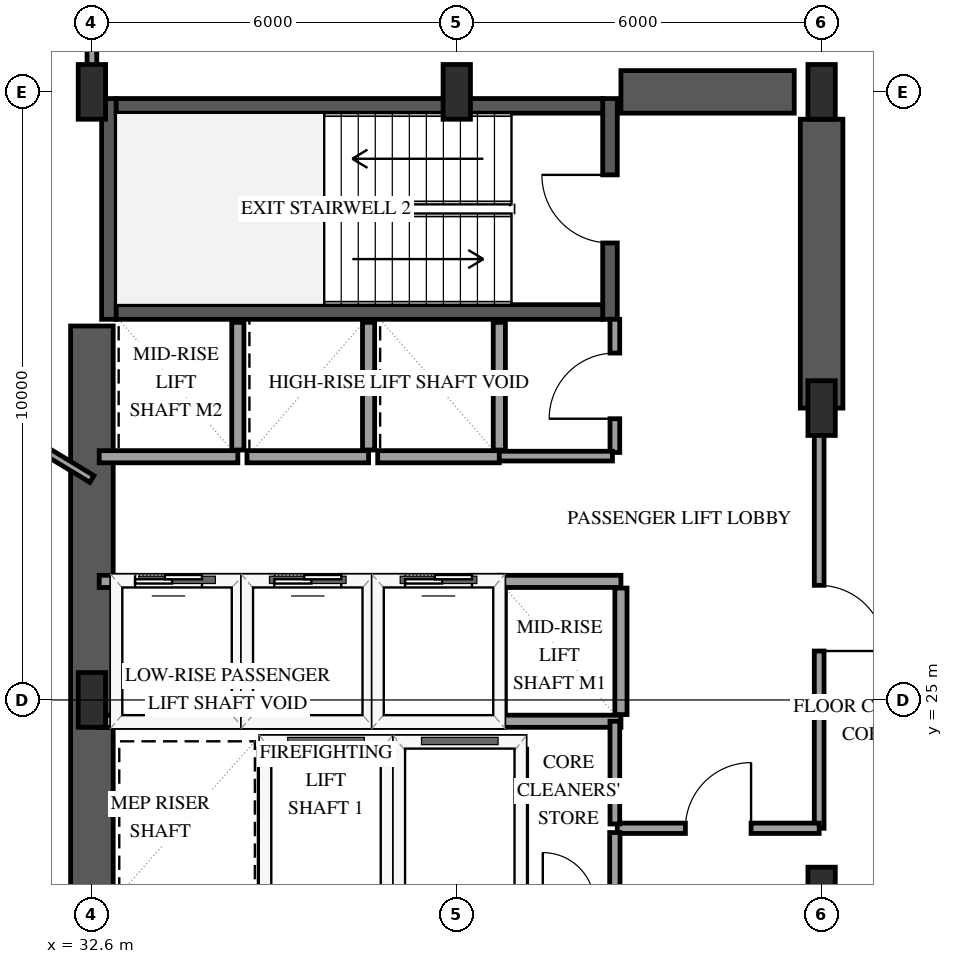
"""IFC4 building model, lengths in metres.
Left out: names, types, materials, properties, quantities, classifications, styles, units other than length and angle.
Written with IfcOpenShell. Run it as: python <this file> out.ifc"""

import sys

from ifc_helpers import new_model, si_unit, direction, frame, frame_2d, origin, origin_2d, place, context, subcontext, project, spatial, rectangle, extrude, element, fill, save


model = new_model("IFC4")
c1 = context("Model", 3, precision=1e-05, world=origin(), true_north=direction((0.0, 1.0)))
c2 = subcontext(c1, "Body", "Model", "MODEL_VIEW")
j1 = project(units=[si_unit("LENGTHUNIT", "METRE"), si_unit("PLANEANGLEUNIT", "RADIAN")], contexts=[c1])
p1 = place(None, origin())
s1 = spatial("IfcSite", under=j1, at=p1, CompositionType="ELEMENT")
p2 = place(p1, origin())
s2 = spatial("IfcBuilding", under=s1, at=p2, CompositionType="ELEMENT")
p3 = place(p2, frame((0.0, 0.0, 78.6)))
s3 = spatial("IfcBuildingStorey", under=s2, at=p3, CompositionType="ELEMENT", Elevation=78.6)
p4 = place(p3, frame((32.88, 31.26, 0.0), z_axis=(0.0, 0.0, 1.0), x_axis=(0.0, 1.0, 0.0)))
e1 = element("IfcWall", 1, at=p4, inside=s3, PredefinedType="SHEAR", context=c2, shape_type="SweptSolid", body=[
    extrude(rectangle(XDim=3.63, YDim=0.24, at=frame_2d((1.815, 0.0))), origin(), (0.0, 0.0, 1.0), 4.0),
])
p5 = place(p3, frame((41.12, 31.26, 0.0), z_axis=(0.0, 0.0, 1.0), x_axis=(0.0, 1.0, 0.0)))
e2 = element("IfcWall", 2, at=p5, inside=s3, PredefinedType="SHEAR", context=c2, shape_type="SweptSolid", body=[
    extrude(rectangle(XDim=3.63, YDim=0.24, at=frame_2d((1.815, 0.0))), origin(), (0.0, 0.0, 1.0), 4.0),
])
p6 = place(p5, frame((1.255, 0.0, 0.0)))
e3 = element("IfcOpeningElement", 3, at=p6, cuts=e2, PredefinedType="OPENING", context=c2, shape_type="SweptSolid", body=[
    extrude(rectangle(XDim=1.12, YDim=2.15, at=frame_2d((0.56, 1.075))), frame((0.0, 0.13, 0.0), z_axis=(0.0, -1.0, 0.0), x_axis=(1.0, 0.0, 0.0)), (0.0, 0.0, 1.0), 0.26),
])
for number, where, z_axis, x_axis in (
    (4, (33.0, 31.38, 0.0), (0.0, 0.0, 1.0), (1.0, 0.0, 0.0)),
    (5, (33.0, 34.77, 0.0), (0.0, 0.0, 1.0), (1.0, 0.0, 0.0)),
):
    element("IfcWall", number, at=place(p3, frame(where, z_axis=z_axis, x_axis=x_axis)), inside=s3, PredefinedType="SHEAR", context=c2, shape_type="SweptSolid", body=[
        extrude(rectangle(XDim=8.0, YDim=0.24, at=frame_2d((4.0, 0.0))), origin(), (0.0, 0.0, 1.0), 4.0),
    ])
p7 = place(p3, frame((32.6, 18.85, 0.0), z_axis=(0.0, 0.0, 1.0), x_axis=(0.0, 1.0, 0.0)))
e6 = element("IfcWall", 6, at=p7, inside=s3, PredefinedType="SHEAR", context=c2, shape_type="SweptSolid", body=[
    extrude(rectangle(XDim=12.3, YDim=0.7, at=frame_2d((6.15, 0.0))), origin(), (0.0, 0.0, 1.0), 4.0),
])
p8 = place(p3, frame((41.3, 35.0, 0.0), z_axis=(0.0, 0.0, 1.0), x_axis=(1.0, 0.0, 0.0)))
e7 = element("IfcWall", 7, at=p8, inside=s3, PredefinedType="SHEAR", context=c2, shape_type="SweptSolid", body=[
    extrude(rectangle(XDim=2.85, YDim=0.7, at=frame_2d((1.425, 0.0))), origin(), (0.0, 0.0, 1.0), 4.0),
])
p9 = place(p3, frame((44.6, 29.8, 0.0), z_axis=(0.0, 0.0, 1.0), x_axis=(0.0, 1.0, 0.0)))
e8 = element("IfcWall", 8, at=p9, inside=s3, PredefinedType="SHEAR", context=c2, shape_type="SweptSolid", body=[
    extrude(rectangle(XDim=4.75, YDim=0.7, at=frame_2d((2.375, 0.0))), origin(), (0.0, 0.0, 1.0), 4.0),
])
for number, where, z_axis, x_axis in (
    (9, (32.6, 25.0, 0.0), (0.0, 0.0, 1.0), (1.0, 0.0, 0.0)),
    (10, (32.6, 35.0, 0.0), (0.0, 0.0, 1.0), (1.0, 0.0, 0.0)),
    (11, (38.6, 35.0, 0.0), (0.0, 0.0, 1.0), (1.0, 0.0, 0.0)),
    (12, (44.6, 21.8, 0.0), (0.0, 0.0, 1.0), (1.0, 0.0, 0.0)),
    (13, (44.6, 29.8, 0.0), (0.0, 0.0, 1.0), (1.0, 0.0, 0.0)),
    (14, (44.6, 35.0, 0.0), (0.0, 0.0, 1.0), (1.0, 0.0, 0.0)),
):
    element("IfcColumn", number, at=place(p3, frame(where, z_axis=z_axis, x_axis=x_axis)), inside=s3, PredefinedType="PILASTER", context=c2, shape_type="SweptSolid", body=[
        extrude(rectangle(XDim=0.45, YDim=0.9, at=origin_2d()), origin(), (0.0, 0.0, 1.0), 4.0),
    ])
p10 = place(p3, frame((35.45, 24.3, 0.0), z_axis=(0.0, 0.0, 1.0), x_axis=(1.0, 0.0, 0.0)))
e15 = element("IfcWall", 15, at=p10, inside=s3, PredefinedType="SOLIDWALL", context=c2, shape_type="SweptSolid", body=[
    extrude(rectangle(XDim=2.0, YDim=0.2, at=frame_2d((1.0, 0.0))), origin(), (0.0, 0.0, 1.0), 3.66),
])
for number, where, z_axis, x_axis in (
    (16, (35.45, 21.81, 0.0), (0.0, 0.0, 1.0), (0.0, 1.0, 0.0)),
    (17, (37.45, 21.81, 0.0), (0.0, 0.0, 1.0), (0.0, 1.0, 0.0)),
):
    element("IfcWall", number, at=place(p3, frame(where, z_axis=z_axis, x_axis=x_axis)), inside=s3, PredefinedType="SOLIDWALL", context=c2, shape_type="SweptSolid", body=[
        extrude(rectangle(XDim=2.38, YDim=0.2, at=frame_2d((1.19, 0.0))), origin(), (0.0, 0.0, 1.0), 3.66),
    ])
p11 = place(p3, frame((37.65, 24.3, 0.0), z_axis=(0.0, 0.0, 1.0), x_axis=(1.0, 0.0, 0.0)))
e18 = element("IfcWall", 18, at=p11, inside=s3, PredefinedType="SOLIDWALL", context=c2, shape_type="SweptSolid", body=[
    extrude(rectangle(XDim=2.0, YDim=0.2, at=frame_2d((1.0, 0.0))), origin(), (0.0, 0.0, 1.0), 3.66),
])
p12 = place(p3, frame((39.65, 21.81, 0.0), z_axis=(0.0, 0.0, 1.0), x_axis=(0.0, 1.0, 0.0)))
e19 = element("IfcWall", 19, at=p12, inside=s3, PredefinedType="SOLIDWALL", context=c2, shape_type="SweptSolid", body=[
    extrude(rectangle(XDim=2.38, YDim=0.2, at=frame_2d((1.19, 0.0))), origin(), (0.0, 0.0, 1.0), 3.66),
])
p13 = place(p3, frame((32.72, 24.65, 0.0), z_axis=(0.0, 0.0, 1.0), x_axis=(1.0, 0.0, 0.0)))
e20 = element("IfcWall", 20, at=p13, inside=s3, PredefinedType="SOLIDWALL", context=c2, shape_type="SweptSolid", body=[
    extrude(rectangle(XDim=2.28, YDim=0.2, at=frame_2d((1.14, 0.0))), origin(), (0.0, 0.0, 1.0), 3.66),
])
p14 = place(p3, frame((32.72, 26.95, 0.0), z_axis=(0.0, 0.0, 1.0), x_axis=(1.0, 0.0, 0.0)))
e21 = element("IfcWall", 21, at=p14, inside=s3, PredefinedType="SOLIDWALL", context=c2, shape_type="SweptSolid", body=[
    extrude(rectangle(XDim=2.28, YDim=0.2, at=frame_2d((1.14, 0.0))), origin(), (0.0, 0.0, 1.0), 3.66),
])
p15 = place(p14, frame((0.59, 0.0, 0.0)))
e22 = element("IfcOpeningElement", 22, at=p15, cuts=e21, PredefinedType="OPENING", context=c2, shape_type="SweptSolid", body=[
    extrude(rectangle(XDim=1.1, YDim=2.15, at=frame_2d((0.55, 1.075))), frame((0.0, 0.11, 0.0), z_axis=(0.0, -1.0, 0.0), x_axis=(1.0, 0.0, 0.0)), (0.0, 0.0, 1.0), 0.22),
])
p16 = place(p3, frame((35.0, 24.76, 0.0), z_axis=(0.0, 0.0, 1.0), x_axis=(0.0, 1.0, 0.0)))
e23 = element("IfcWall", 23, at=p16, inside=s3, PredefinedType="SOLIDWALL", context=c2, shape_type="SweptSolid", body=[
    extrude(rectangle(XDim=2.08, YDim=0.2, at=frame_2d((1.04, 0.0))), origin(), (0.0, 0.0, 1.0), 3.66),
])
p17 = place(p3, frame((35.15, 24.65, 0.0), z_axis=(0.0, 0.0, 1.0), x_axis=(1.0, 0.0, 0.0)))
e24 = element("IfcWall", 24, at=p17, inside=s3, PredefinedType="SOLIDWALL", context=c2, shape_type="SweptSolid", body=[
    extrude(rectangle(XDim=2.0, YDim=0.2, at=frame_2d((1.0, 0.0))), origin(), (0.0, 0.0, 1.0), 3.66),
])
p18 = place(p3, frame((35.15, 26.95, 0.0), z_axis=(0.0, 0.0, 1.0), x_axis=(1.0, 0.0, 0.0)))
e25 = element("IfcWall", 25, at=p18, inside=s3, PredefinedType="SOLIDWALL", context=c2, shape_type="SweptSolid", body=[
    extrude(rectangle(XDim=2.0, YDim=0.2, at=frame_2d((1.0, 0.0))), origin(), (0.0, 0.0, 1.0), 3.66),
])
p19 = place(p18, frame((0.45, 0.0, 0.0)))
e26 = element("IfcOpeningElement", 26, at=p19, cuts=e25, PredefinedType="OPENING", context=c2, shape_type="SweptSolid", body=[
    extrude(rectangle(XDim=1.1, YDim=2.15, at=frame_2d((0.55, 1.075))), frame((0.0, 0.11, 0.0), z_axis=(0.0, -1.0, 0.0), x_axis=(1.0, 0.0, 0.0)), (0.0, 0.0, 1.0), 0.22),
])
p20 = place(p3, frame((37.15, 24.76, 0.0), z_axis=(0.0, 0.0, 1.0), x_axis=(0.0, 1.0, 0.0)))
e27 = element("IfcWall", 27, at=p20, inside=s3, PredefinedType="SOLIDWALL", context=c2, shape_type="SweptSolid", body=[
    extrude(rectangle(XDim=2.08, YDim=0.2, at=frame_2d((1.04, 0.0))), origin(), (0.0, 0.0, 1.0), 3.66),
])
p21 = place(p3, frame((37.3, 24.65, 0.0), z_axis=(0.0, 0.0, 1.0), x_axis=(1.0, 0.0, 0.0)))
e28 = element("IfcWall", 28, at=p21, inside=s3, PredefinedType="SOLIDWALL", context=c2, shape_type="SweptSolid", body=[
    extrude(rectangle(XDim=2.0, YDim=0.2, at=frame_2d((1.0, 0.0))), origin(), (0.0, 0.0, 1.0), 3.66),
])
p22 = place(p3, frame((37.3, 26.95, 0.0), z_axis=(0.0, 0.0, 1.0), x_axis=(1.0, 0.0, 0.0)))
e29 = element("IfcWall", 29, at=p22, inside=s3, PredefinedType="SOLIDWALL", context=c2, shape_type="SweptSolid", body=[
    extrude(rectangle(XDim=2.0, YDim=0.2, at=frame_2d((1.0, 0.0))), origin(), (0.0, 0.0, 1.0), 3.66),
])
p23 = place(p22, frame((0.45, 0.0, 0.0)))
e30 = element("IfcOpeningElement", 30, at=p23, cuts=e29, PredefinedType="OPENING", context=c2, shape_type="SweptSolid", body=[
    extrude(rectangle(XDim=1.1, YDim=2.15, at=frame_2d((0.55, 1.075))), frame((0.0, 0.11, 0.0), z_axis=(0.0, -1.0, 0.0), x_axis=(1.0, 0.0, 0.0)), (0.0, 0.0, 1.0), 0.22),
])
p24 = place(p3, frame((39.3, 24.76, 0.0), z_axis=(0.0, 0.0, 1.0), x_axis=(0.0, 1.0, 0.0)))
e31 = element("IfcWall", 31, at=p24, inside=s3, PredefinedType="SOLIDWALL", context=c2, shape_type="SweptSolid", body=[
    extrude(rectangle(XDim=2.08, YDim=0.2, at=frame_2d((1.04, 0.0))), origin(), (0.0, 0.0, 1.0), 3.66),
])
for number, where, z_axis, x_axis in (
    (32, (39.3, 24.65, 0.0), (0.0, 0.0, 1.0), (1.0, 0.0, 0.0)),
    (33, (39.3, 26.95, 0.0), (0.0, 0.0, 1.0), (1.0, 0.0, 0.0)),
):
    element("IfcWall", number, at=place(p3, frame(where, z_axis=z_axis, x_axis=x_axis)), inside=s3, PredefinedType="SOLIDWALL", context=c2, shape_type="SweptSolid", body=[
        extrude(rectangle(XDim=2.0, YDim=0.2, at=frame_2d((1.0, 0.0))), origin(), (0.0, 0.0, 1.0), 3.66),
    ])
p25 = place(p3, frame((41.3, 24.76, 0.0), z_axis=(0.0, 0.0, 1.0), x_axis=(0.0, 1.0, 0.0)))
e34 = element("IfcWall", 34, at=p25, inside=s3, PredefinedType="SOLIDWALL", context=c2, shape_type="SweptSolid", body=[
    extrude(rectangle(XDim=2.08, YDim=0.2, at=frame_2d((1.04, 0.0))), origin(), (0.0, 0.0, 1.0), 3.66),
])
p26 = place(p3, frame((32.72, 29.0, 0.0), z_axis=(0.0, 0.0, 1.0), x_axis=(1.0, 0.0, 0.0)))
e35 = element("IfcWall", 35, at=p26, inside=s3, PredefinedType="SOLIDWALL", context=c2, shape_type="SweptSolid", body=[
    extrude(rectangle(XDim=2.28, YDim=0.2, at=frame_2d((1.14, 0.0))), origin(), (0.0, 0.0, 1.0), 3.66),
])
p27 = place(p3, frame((35.0, 29.11, 0.0), z_axis=(0.0, 0.0, 1.0), x_axis=(0.0, 1.0, 0.0)))
e36 = element("IfcWall", 36, at=p27, inside=s3, PredefinedType="SOLIDWALL", context=c2, shape_type="SweptSolid", body=[
    extrude(rectangle(XDim=2.1, YDim=0.2, at=frame_2d((1.05, 0.0))), origin(), (0.0, 0.0, 1.0), 3.66),
])
p28 = place(p3, frame((35.15, 29.0, 0.0), z_axis=(0.0, 0.0, 1.0), x_axis=(1.0, 0.0, 0.0)))
e37 = element("IfcWall", 37, at=p28, inside=s3, PredefinedType="SOLIDWALL", context=c2, shape_type="SweptSolid", body=[
    extrude(rectangle(XDim=2.0, YDim=0.2, at=frame_2d((1.0, 0.0))), origin(), (0.0, 0.0, 1.0), 3.66),
])
p29 = place(p3, frame((37.15, 29.11, 0.0), z_axis=(0.0, 0.0, 1.0), x_axis=(0.0, 1.0, 0.0)))
e38 = element("IfcWall", 38, at=p29, inside=s3, PredefinedType="SOLIDWALL", context=c2, shape_type="SweptSolid", body=[
    extrude(rectangle(XDim=2.1, YDim=0.2, at=frame_2d((1.05, 0.0))), origin(), (0.0, 0.0, 1.0), 3.66),
])
p30 = place(p3, frame((37.3, 29.0, 0.0), z_axis=(0.0, 0.0, 1.0), x_axis=(1.0, 0.0, 0.0)))
e39 = element("IfcWall", 39, at=p30, inside=s3, PredefinedType="SOLIDWALL", context=c2, shape_type="SweptSolid", body=[
    extrude(rectangle(XDim=2.0, YDim=0.2, at=frame_2d((1.0, 0.0))), origin(), (0.0, 0.0, 1.0), 3.66),
])
p31 = place(p3, frame((39.3, 29.11, 0.0), z_axis=(0.0, 0.0, 1.0), x_axis=(0.0, 1.0, 0.0)))
e40 = element("IfcWall", 40, at=p31, inside=s3, PredefinedType="SOLIDWALL", context=c2, shape_type="SweptSolid", body=[
    extrude(rectangle(XDim=2.1, YDim=0.2, at=frame_2d((1.05, 0.0))), origin(), (0.0, 0.0, 1.0), 3.66),
])
p32 = place(p3, frame((32.6, 28.634, 0.0), z_axis=(0.0, 0.0, 1.0), x_axis=(-0.855395761356, 0.517974991147, 0.0)))
e41 = element("IfcWall", 41, at=p32, inside=s3, PredefinedType="PARTITIONING", context=c2, shape_type="SweptSolid", body=[
    extrude(rectangle(XDim=7.122, YDim=0.13, at=frame_2d((3.561, 0.0))), origin(), (0.0, 0.0, 1.0), 3.66),
])
p33 = place(p3, frame((44.56, 29.8, 0.0), z_axis=(0.0, 0.0, 1.0), x_axis=(0.0, -1.0, 0.0)))
e42 = element("IfcWall", 42, at=p33, inside=s3, PredefinedType="PARTITIONING", context=c2, shape_type="SweptSolid", body=[
    extrude(rectangle(XDim=6.91, YDim=0.16, at=frame_2d((3.455, 0.0))), origin(), (0.0, 0.0, 1.0), 2.7),
])
p34 = place(p33, frame((2.915, 0.0, 0.0)))
e43 = element("IfcOpeningElement", 43, at=p34, cuts=e42, PredefinedType="OPENING", context=c2, shape_type="SweptSolid", body=[
    extrude(rectangle(XDim=1.08, YDim=2.15, at=frame_2d((0.54, 1.075))), frame((0.0, 0.09, 0.0), z_axis=(0.0, -1.0, 0.0), x_axis=(1.0, 0.0, 0.0)), (0.0, 0.0, 1.0), 0.18),
])
p35 = place(p3, frame((41.24, 22.89, 0.0), z_axis=(0.0, 0.0, 1.0), x_axis=(1.0, 0.0, 0.0)))
e44 = element("IfcWall", 44, at=p35, inside=s3, PredefinedType="PARTITIONING", context=c2, shape_type="SweptSolid", body=[
    extrude(rectangle(XDim=3.32, YDim=0.17, at=frame_2d((1.66, 0.0))), origin(), (0.0, 0.0, 1.0), 3.66),
])
p36 = place(p35, frame((1.12, 0.0, 0.0)))
e45 = element("IfcOpeningElement", 45, at=p36, cuts=e44, PredefinedType="OPENING", context=c2, shape_type="SweptSolid", body=[
    extrude(rectangle(XDim=1.08, YDim=2.15, at=frame_2d((0.54, 1.075))), frame((0.0, 0.095, 0.0), z_axis=(0.0, -1.0, 0.0), x_axis=(1.0, 0.0, 0.0)), (0.0, 0.0, 1.0), 0.19),
])
p37 = place(p3, frame((41.2, 29.07, 0.0), z_axis=(0.0, 0.0, 1.0), x_axis=(0.0, 1.0, 0.0)))
e46 = element("IfcWall", 46, at=p37, inside=s3, PredefinedType="PARTITIONING", context=c2, shape_type="SweptSolid", body=[
    extrude(rectangle(XDim=2.19, YDim=0.16, at=frame_2d((1.095, 0.0))), origin(), (0.0, 0.0, 1.0), 3.66),
])
p38 = place(p37, frame((0.555, 0.0, 0.0)))
e47 = element("IfcOpeningElement", 47, at=p38, cuts=e46, PredefinedType="OPENING", context=c2, shape_type="SweptSolid", body=[
    extrude(rectangle(XDim=1.08, YDim=2.15, at=frame_2d((0.54, 1.075))), frame((0.0, 0.09, 0.0), z_axis=(0.0, -1.0, 0.0), x_axis=(1.0, 0.0, 0.0)), (0.0, 0.0, 1.0), 0.18),
])
p39 = place(p3, frame((32.6, 35.07, 0.0), z_axis=(0.0, 0.0, 1.0), x_axis=(0.0, 1.0, 0.0)))
e48 = element("IfcWall", 48, at=p39, inside=s3, PredefinedType="PARTITIONING", context=c2, shape_type="SweptSolid", body=[
    extrude(rectangle(XDim=1.91, YDim=0.16, at=frame_2d((0.955, 0.0))), origin(), (0.0, 0.0, 1.0), 3.66),
])
p40 = place(p3, frame((39.3, 29.01, 0.0), z_axis=(0.0, 0.0, 1.0), x_axis=(1.0, 0.0, 0.0)))
e49 = element("IfcWall", 49, at=p40, inside=s3, PredefinedType="PARTITIONING", context=c2, shape_type="SweptSolid", body=[
    extrude(rectangle(XDim=1.86, YDim=0.16, at=frame_2d((0.93, 0.0))), origin(), (0.0, 0.0, 1.0), 3.66),
])
p41 = place(p3, frame((41.2, 22.96, 0.0), z_axis=(0.0, 0.0, 1.0), x_axis=(0.0, 1.0, 0.0)))
e50 = element("IfcWall", 50, at=p41, inside=s3, PredefinedType="PARTITIONING", context=c2, shape_type="SweptSolid", body=[
    extrude(rectangle(XDim=1.69, YDim=0.16, at=frame_2d((0.845, 0.0))), origin(), (0.0, 0.0, 1.0), 3.66),
])
p42 = place(p3, frame((41.2, 21.7, 0.0), z_axis=(0.0, 0.0, 1.0), x_axis=(0.0, 1.0, 0.0)))
e51 = element("IfcWall", 51, at=p42, inside=s3, PredefinedType="PARTITIONING", context=c2, shape_type="SweptSolid", body=[
    extrude(rectangle(XDim=1.12, YDim=0.17, at=frame_2d((0.56, 0.0))), origin(), (0.0, 0.0, 1.0), 3.66),
])
p43 = place(p15, origin())
e52 = element("IfcDoor", 52, at=p43, inside=s3, OperationType="SLIDING_TO_LEFT", PredefinedType="DOOR", context=c2, shape_type="SweptSolid", body=[
    extrude(rectangle(XDim=1.1, YDim=2.15, at=frame_2d((0.55, 1.075))), frame((0.0, 0.025, 0.0), z_axis=(0.0, -1.0, 0.0), x_axis=(1.0, 0.0, 0.0)), (0.0, 0.0, 1.0), 0.05),
])
fill(e22, e52)
p44 = place(p19, origin())
e53 = element("IfcDoor", 53, at=p44, inside=s3, OperationType="SLIDING_TO_LEFT", PredefinedType="DOOR", context=c2, shape_type="SweptSolid", body=[
    extrude(rectangle(XDim=1.1, YDim=2.15, at=frame_2d((0.55, 1.075))), frame((0.0, 0.025, 0.0), z_axis=(0.0, -1.0, 0.0), x_axis=(1.0, 0.0, 0.0)), (0.0, 0.0, 1.0), 0.05),
])
fill(e26, e53)
p45 = place(p23, origin())
e54 = element("IfcDoor", 54, at=p45, inside=s3, OperationType="SLIDING_TO_LEFT", PredefinedType="DOOR", context=c2, shape_type="SweptSolid", body=[
    extrude(rectangle(XDim=1.1, YDim=2.15, at=frame_2d((0.55, 1.075))), frame((0.0, 0.025, 0.0), z_axis=(0.0, -1.0, 0.0), x_axis=(1.0, 0.0, 0.0)), (0.0, 0.0, 1.0), 0.05),
])
fill(e30, e54)
p46 = place(p6, origin())
e55 = element("IfcDoor", 55, at=p46, inside=s3, OperationType="SINGLE_SWING_RIGHT", PredefinedType="DOOR", context=c2, shape_type="SweptSolid", body=[
    extrude(rectangle(XDim=1.12, YDim=2.15, at=frame_2d((0.56, 1.075))), frame((0.0, 0.025, 0.0), z_axis=(0.0, -1.0, 0.0), x_axis=(1.0, 0.0, 0.0)), (0.0, 0.0, 1.0), 0.05),
])
fill(e3, e55)
p47 = place(p34, origin())
e56 = element("IfcDoor", 56, at=p47, inside=s3, OperationType="SINGLE_SWING_RIGHT", PredefinedType="DOOR", context=c2, shape_type="SweptSolid", body=[
    extrude(rectangle(XDim=1.08, YDim=2.15, at=frame_2d((0.54, 1.075))), frame((0.0, 0.025, 0.0), z_axis=(0.0, -1.0, 0.0), x_axis=(1.0, 0.0, 0.0)), (0.0, 0.0, 1.0), 0.05),
])
fill(e43, e56)
p48 = place(p36, origin())
e57 = element("IfcDoor", 57, at=p48, inside=s3, OperationType="SINGLE_SWING_RIGHT", PredefinedType="DOOR", context=c2, shape_type="SweptSolid", body=[
    extrude(rectangle(XDim=1.08, YDim=2.15, at=frame_2d((0.54, 1.075))), frame((0.0, 0.025, 0.0), z_axis=(0.0, -1.0, 0.0), x_axis=(1.0, 0.0, 0.0)), (0.0, 0.0, 1.0), 0.05),
])
fill(e45, e57)
p49 = place(p38, origin())
e58 = element("IfcDoor", 58, at=p49, inside=s3, OperationType="SINGLE_SWING_LEFT", PredefinedType="DOOR", context=c2, shape_type="SweptSolid", body=[
    extrude(rectangle(XDim=1.08, YDim=2.15, at=frame_2d((0.54, 1.075))), frame((0.0, 0.025, 0.0), z_axis=(0.0, -1.0, 0.0), x_axis=(1.0, 0.0, 0.0)), (0.0, 0.0, 1.0), 0.05),
])
fill(e47, e58)
save(model, sys.argv[1])
